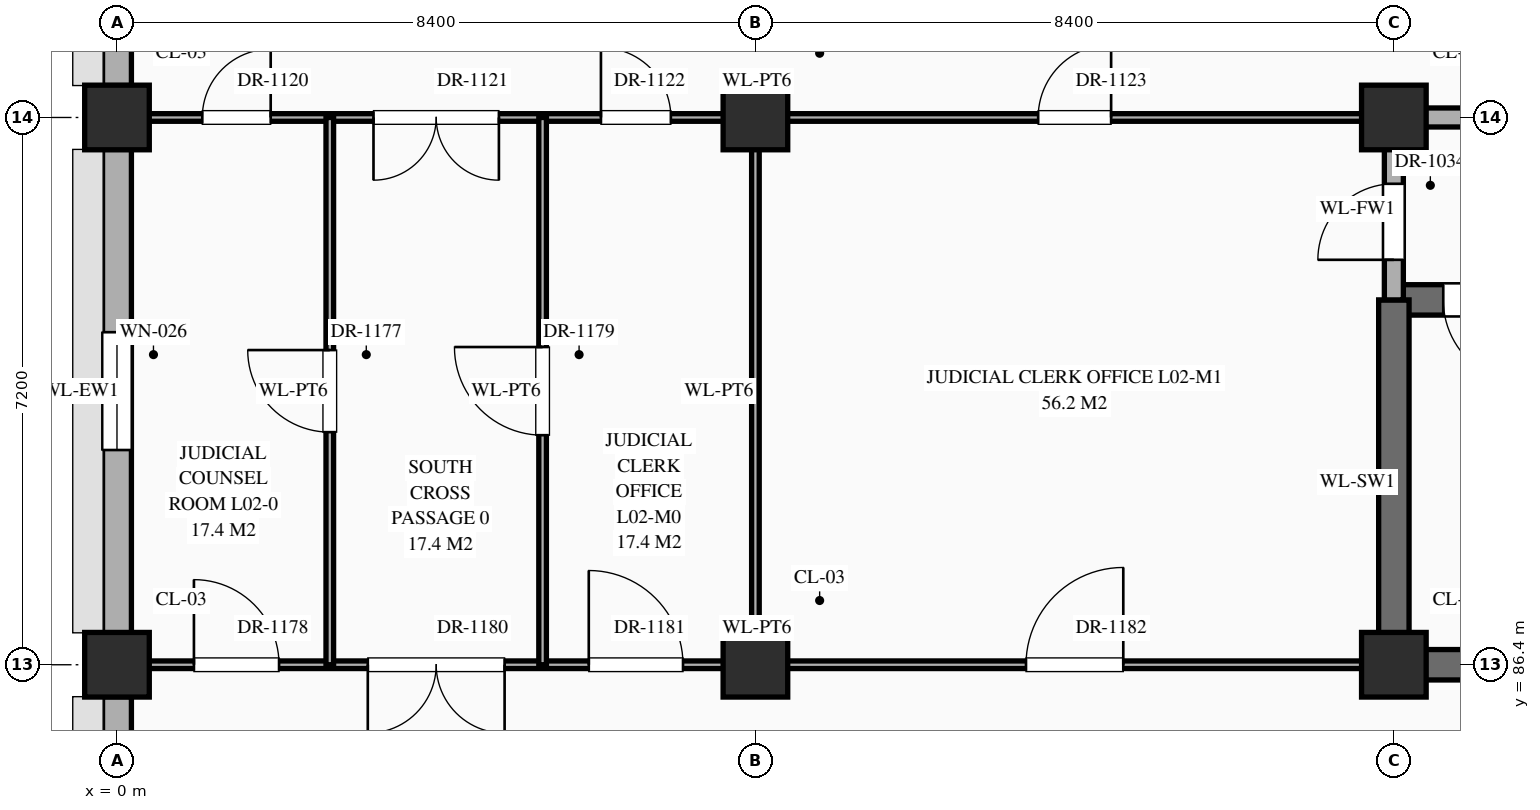
"""IFC4 building model, lengths in metres.
Left out: names, types, materials, properties, quantities, classifications, styles, units other than length and angle.
Written with IfcOpenShell. Run it as: python <this file> out.ifc"""

import sys

from ifc_helpers import new_model, si_unit, direction, frame, frame_2d, origin, origin_2d, place, context, subcontext, project, spatial, rectangle, extrude, element, fill, save


model = new_model("IFC4")
c1 = context("Model", 3, precision=1e-05, world=origin(), true_north=direction((0.0, 1.0)))
c2 = subcontext(c1, "Body", "Model", "MODEL_VIEW")
j1 = project(units=[si_unit("LENGTHUNIT", "METRE"), si_unit("PLANEANGLEUNIT", "RADIAN")], contexts=[c1])
p1 = place(None, origin())
s1 = spatial("IfcSite", under=j1, at=p1, CompositionType="ELEMENT")
p2 = place(p1, origin())
s2 = spatial("IfcBuilding", under=s1, at=p2, CompositionType="ELEMENT")
p3 = place(p2, frame((0.0, 0.0, 5.4)))
s3 = spatial("IfcBuildingStorey", under=s2, at=p3, CompositionType="ELEMENT", Elevation=5.4)
for number, where, z_axis, x_axis in (
    (1, (0.0, 86.4, 0.0), (0.0, 0.0, 1.0), (1.0, 0.0, 0.0)),
    (2, (0.0, 93.6, 0.0), (0.0, 0.0, 1.0), (1.0, 0.0, 0.0)),
    (3, (8.4, 86.4, 0.0), (0.0, 0.0, 1.0), (1.0, 0.0, 0.0)),
    (4, (8.4, 93.6, 0.0), (0.0, 0.0, 1.0), (1.0, 0.0, 0.0)),
    (5, (16.8, 86.4, 0.0), (0.0, 0.0, 1.0), (1.0, 0.0, 0.0)),
    (6, (16.8, 93.6, 0.0), (0.0, 0.0, 1.0), (1.0, 0.0, 0.0)),
):
    element("IfcColumn", number, at=place(p3, frame(where, z_axis=z_axis, x_axis=x_axis)), inside=s3, PredefinedType="COLUMN", context=c2, shape_type="SweptSolid", body=[
        extrude(rectangle(XDim=0.85, YDim=0.85, at=origin_2d()), origin(), (0.0, 0.0, 1.0), 5.4),
    ])
p4 = place(p3, frame((0.0, 79.62, 0.0), z_axis=(0.0, 0.0, 1.0), x_axis=(0.0, 1.0, 0.0)))
e7 = element("IfcWall", 7, at=p4, inside=s3, PredefinedType="STANDARD", context=c2, shape_type="SweptSolid", body=[
    extrude(rectangle(XDim=6.36, YDim=0.38, at=frame_2d((3.18, 0.0))), origin(), (0.0, 0.0, 1.0), 4.47),
])
p5 = place(p4, frame((1.205, 0.0, 0.85)))
e8 = element("IfcOpeningElement", 8, at=p5, cuts=e7, PredefinedType="OPENING", context=c2, shape_type="SweptSolid", body=[
    extrude(rectangle(XDim=1.55, YDim=1.38, at=frame_2d((0.775, 0.69))), frame((0.0, 0.202, 0.0), z_axis=(0.0, -1.0, 0.0), x_axis=(1.0, 0.0, 0.0)), (0.0, 0.0, 1.0), 0.404),
])
p6 = place(p3, frame((0.0, 86.82, 0.0), z_axis=(0.0, 0.0, 1.0), x_axis=(0.0, 1.0, 0.0)))
e9 = element("IfcWall", 9, at=p6, inside=s3, PredefinedType="STANDARD", context=c2, shape_type="SweptSolid", body=[
    extrude(rectangle(XDim=6.36, YDim=0.38, at=frame_2d((3.18, 0.0))), origin(), (0.0, 0.0, 1.0), 4.47),
])
p7 = place(p6, frame((2.405, 0.0, 0.85)))
e10 = element("IfcOpeningElement", 10, at=p7, cuts=e9, PredefinedType="OPENING", context=c2, shape_type="SweptSolid", body=[
    extrude(rectangle(XDim=1.55, YDim=1.56, at=frame_2d((0.775, 0.78))), frame((0.0, 0.202, 0.0), z_axis=(0.0, -1.0, 0.0), x_axis=(1.0, 0.0, 0.0)), (0.0, 0.0, 1.0), 0.404),
])
p8 = place(p3, frame((0.0, 94.02, 0.0), z_axis=(0.0, 0.0, 1.0), x_axis=(0.0, 1.0, 0.0)))
e11 = element("IfcWall", 11, at=p8, inside=s3, PredefinedType="STANDARD", context=c2, shape_type="SweptSolid", body=[
    extrude(rectangle(XDim=6.36, YDim=0.38, at=frame_2d((3.18, 0.0))), origin(), (0.0, 0.0, 1.0), 4.47),
])
p9 = place(p8, frame((3.705, 0.0, 0.85)))
e12 = element("IfcOpeningElement", 12, at=p9, cuts=e11, PredefinedType="OPENING", context=c2, shape_type="SweptSolid", body=[
    extrude(rectangle(XDim=1.55, YDim=1.74, at=frame_2d((0.775, 0.87))), frame((0.0, 0.202, 0.0), z_axis=(0.0, -1.0, 0.0), x_axis=(1.0, 0.0, 0.0)), (0.0, 0.0, 1.0), 0.404),
])
p10 = place(p3, frame((0.04, 86.4, 0.0), z_axis=(0.0, 0.0, 1.0), x_axis=(1.0, 0.0, 0.0)))
e13 = element("IfcWall", 13, at=p10, inside=s3, PredefinedType="STANDARD", context=c2, shape_type="SweptSolid", body=[
    extrude(rectangle(XDim=16.76, YDim=0.1, at=frame_2d((8.38, 0.0))), origin(), (0.0, 0.0, 1.0), 4.27),
])
p11 = place(p10, frame((0.972, 0.0, 0.0)))
e14 = element("IfcOpeningElement", 14, at=p11, cuts=e13, PredefinedType="OPENING", context=c2, shape_type="SweptSolid", body=[
    extrude(rectangle(XDim=1.12, YDim=2.25, at=frame_2d((0.56, 1.125))), frame((0.0, 0.062, 0.0), z_axis=(0.0, -1.0, 0.0), x_axis=(1.0, 0.0, 0.0)), (0.0, 0.0, 1.0), 0.124),
])
p12 = place(p10, frame((3.26, 0.0, 0.0)))
e15 = element("IfcOpeningElement", 15, at=p12, cuts=e13, PredefinedType="OPENING", context=c2, shape_type="SweptSolid", body=[
    extrude(rectangle(XDim=1.8, YDim=2.5, at=frame_2d((0.9, 1.25))), frame((0.0, 0.062, 0.0), z_axis=(0.0, -1.0, 0.0), x_axis=(1.0, 0.0, 0.0)), (0.0, 0.0, 1.0), 0.124),
])
p13 = place(p10, frame((6.167, 0.0, 0.0)))
e16 = element("IfcOpeningElement", 16, at=p13, cuts=e13, PredefinedType="OPENING", context=c2, shape_type="SweptSolid", body=[
    extrude(rectangle(XDim=1.24, YDim=2.3, at=frame_2d((0.62, 1.15))), frame((0.0, 0.062, 0.0), z_axis=(0.0, -1.0, 0.0), x_axis=(1.0, 0.0, 0.0)), (0.0, 0.0, 1.0), 0.124),
])
p14 = place(p10, frame((11.92, 0.0, 0.0)))
e17 = element("IfcOpeningElement", 17, at=p14, cuts=e13, PredefinedType="OPENING", context=c2, shape_type="SweptSolid", body=[
    extrude(rectangle(XDim=1.28, YDim=2.35, at=frame_2d((0.64, 1.175))), frame((0.0, 0.062, 0.0), z_axis=(0.0, -1.0, 0.0), x_axis=(1.0, 0.0, 0.0)), (0.0, 0.0, 1.0), 0.124),
])
p15 = place(p3, frame((16.8, 86.4, 0.0), z_axis=(0.0, 0.0, 1.0), x_axis=(1.0, 0.0, 0.0)))
e18 = element("IfcWall", 18, at=p15, inside=s3, PredefinedType="SHEAR", context=c2, shape_type="SweptSolid", body=[
    extrude(rectangle(XDim=8.4, YDim=0.4, at=frame_2d((4.2, 0.0))), origin(), (0.0, 0.0, 1.0), 5.12),
])
p16 = place(p3, frame((16.8, 91.2, 0.0), z_axis=(0.0, 0.0, 1.0), x_axis=(1.0, 0.0, 0.0)))
e19 = element("IfcWall", 19, at=p16, inside=s3, PredefinedType="SHEAR", context=c2, shape_type="SweptSolid", body=[
    extrude(rectangle(XDim=8.4, YDim=0.4, at=frame_2d((4.2, 0.0))), origin(), (0.0, 0.0, 1.0), 5.12),
])
p17 = place(p16, frame((0.65, 0.0, 0.0)))
e20 = element("IfcOpeningElement", 20, at=p17, cuts=e19, PredefinedType="OPENING", context=c2, shape_type="SweptSolid", body=[
    extrude(rectangle(XDim=1.1, YDim=2.2, at=frame_2d((0.55, 1.1))), frame((0.0, 0.212, 0.0), z_axis=(0.0, -1.0, 0.0), x_axis=(1.0, 0.0, 0.0)), (0.0, 0.0, 1.0), 0.424),
])
p18 = place(p3, frame((0.04, 93.6, 0.0), z_axis=(0.0, 0.0, 1.0), x_axis=(1.0, 0.0, 0.0)))
e21 = element("IfcWall", 21, at=p18, inside=s3, PredefinedType="STANDARD", context=c2, shape_type="SweptSolid", body=[
    extrude(rectangle(XDim=16.76, YDim=0.1, at=frame_2d((8.38, 0.0))), origin(), (0.0, 0.0, 1.0), 4.27),
])
p19 = place(p18, frame((1.083, 0.0, 0.0)))
e22 = element("IfcOpeningElement", 22, at=p19, cuts=e21, PredefinedType="OPENING", context=c2, shape_type="SweptSolid", body=[
    extrude(rectangle(XDim=0.9, YDim=2.15, at=frame_2d((0.45, 1.075))), frame((0.0, 0.062, 0.0), z_axis=(0.0, -1.0, 0.0), x_axis=(1.0, 0.0, 0.0)), (0.0, 0.0, 1.0), 0.124),
])
p20 = place(p18, frame((3.335, 0.0, 0.0)))
e23 = element("IfcOpeningElement", 23, at=p20, cuts=e21, PredefinedType="OPENING", context=c2, shape_type="SweptSolid", body=[
    extrude(rectangle(XDim=1.65, YDim=2.4, at=frame_2d((0.825, 1.2))), frame((0.0, 0.062, 0.0), z_axis=(0.0, -1.0, 0.0), x_axis=(1.0, 0.0, 0.0)), (0.0, 0.0, 1.0), 0.124),
])
p21 = place(p18, frame((6.327, 0.0, 0.0)))
e24 = element("IfcOpeningElement", 24, at=p21, cuts=e21, PredefinedType="OPENING", context=c2, shape_type="SweptSolid", body=[
    extrude(rectangle(XDim=0.92, YDim=2.15, at=frame_2d((0.46, 1.075))), frame((0.0, 0.062, 0.0), z_axis=(0.0, -1.0, 0.0), x_axis=(1.0, 0.0, 0.0)), (0.0, 0.0, 1.0), 0.124),
])
p22 = place(p18, frame((12.08, 0.0, 0.0)))
e25 = element("IfcOpeningElement", 25, at=p22, cuts=e21, PredefinedType="OPENING", context=c2, shape_type="SweptSolid", body=[
    extrude(rectangle(XDim=0.96, YDim=2.2, at=frame_2d((0.48, 1.1))), frame((0.0, 0.062, 0.0), z_axis=(0.0, -1.0, 0.0), x_axis=(1.0, 0.0, 0.0)), (0.0, 0.0, 1.0), 0.124),
])
p23 = place(p3, frame((16.8, 93.6, 0.0), z_axis=(0.0, 0.0, 1.0), x_axis=(1.0, 0.0, 0.0)))
e26 = element("IfcWall", 26, at=p23, inside=s3, PredefinedType="STANDARD", context=c2, shape_type="SweptSolid", body=[
    extrude(rectangle(XDim=8.4, YDim=0.25, at=frame_2d((4.2, 0.0))), origin(), (0.0, 0.0, 1.0), 4.27),
])
p24 = place(p23, frame((3.2, 0.0, 0.0)))
e27 = element("IfcOpeningElement", 27, at=p24, cuts=e26, PredefinedType="OPENING", context=c2, shape_type="SweptSolid", body=[
    extrude(rectangle(XDim=2.0, YDim=2.4, at=frame_2d((1.0, 1.2))), frame((0.0, 0.137, 0.0), z_axis=(0.0, -1.0, 0.0), x_axis=(1.0, 0.0, 0.0)), (0.0, 0.0, 1.0), 0.274),
])
p25 = place(p3, frame((2.8, 86.4, 0.0), z_axis=(0.0, 0.0, 1.0), x_axis=(0.0, 1.0, 0.0)))
e28 = element("IfcWall", 28, at=p25, inside=s3, PredefinedType="STANDARD", context=c2, shape_type="SweptSolid", body=[
    extrude(rectangle(XDim=7.2, YDim=0.1, at=frame_2d((3.6, 0.0))), origin(), (0.0, 0.0, 1.0), 5.12),
])
p26 = place(p25, frame((3.06, 0.0, 0.0)))
e29 = element("IfcOpeningElement", 29, at=p26, cuts=e28, PredefinedType="OPENING", context=c2, shape_type="SweptSolid", body=[
    extrude(rectangle(XDim=1.08, YDim=2.25, at=frame_2d((0.54, 1.125))), frame((0.0, 0.062, 0.0), z_axis=(0.0, -1.0, 0.0), x_axis=(1.0, 0.0, 0.0)), (0.0, 0.0, 1.0), 0.124),
])
p27 = place(p3, frame((5.6, 86.4, 0.0), z_axis=(0.0, 0.0, 1.0), x_axis=(0.0, 1.0, 0.0)))
e30 = element("IfcWall", 30, at=p27, inside=s3, PredefinedType="STANDARD", context=c2, shape_type="SweptSolid", body=[
    extrude(rectangle(XDim=7.2, YDim=0.1, at=frame_2d((3.6, 0.0))), origin(), (0.0, 0.0, 1.0), 5.12),
])
p28 = place(p27, frame((3.02, 0.0, 0.0)))
e31 = element("IfcOpeningElement", 31, at=p28, cuts=e30, PredefinedType="OPENING", context=c2, shape_type="SweptSolid", body=[
    extrude(rectangle(XDim=1.16, YDim=2.3, at=frame_2d((0.58, 1.15))), frame((0.0, 0.062, 0.0), z_axis=(0.0, -1.0, 0.0), x_axis=(1.0, 0.0, 0.0)), (0.0, 0.0, 1.0), 0.124),
])
p29 = place(p3, frame((8.4, 86.4, 0.0), z_axis=(0.0, 0.0, 1.0), x_axis=(0.0, 1.0, 0.0)))
e32 = element("IfcWall", 32, at=p29, inside=s3, PredefinedType="STANDARD", context=c2, shape_type="SweptSolid", body=[
    extrude(rectangle(XDim=7.2, YDim=0.1, at=frame_2d((3.6, 0.0))), origin(), (0.0, 0.0, 1.0), 4.37),
])
p30 = place(p3, frame((16.8, 86.4, 0.0), z_axis=(0.0, 0.0, 1.0), x_axis=(0.0, 1.0, 0.0)))
e33 = element("IfcWall", 33, at=p30, inside=s3, PredefinedType="SHEAR", context=c2, shape_type="SweptSolid", body=[
    extrude(rectangle(XDim=4.8, YDim=0.4, at=frame_2d((2.4, 0.0))), origin(), (0.0, 0.0, 1.0), 5.12),
])
p31 = place(p3, frame((16.8, 91.2, 0.0), z_axis=(0.0, 0.0, 1.0), x_axis=(0.0, 1.0, 0.0)))
e34 = element("IfcWall", 34, at=p31, inside=s3, PredefinedType="STANDARD", context=c2, shape_type="SweptSolid", body=[
    extrude(rectangle(XDim=2.4, YDim=0.25, at=frame_2d((1.2, 0.0))), origin(), (0.0, 0.0, 1.0), 4.37),
])
p32 = place(p31, frame((0.528, 0.0, 0.0)))
e35 = element("IfcOpeningElement", 35, at=p32, cuts=e34, PredefinedType="OPENING", context=c2, shape_type="SweptSolid", body=[
    extrude(rectangle(XDim=1.0, YDim=2.2, at=frame_2d((0.5, 1.1))), frame((0.0, 0.137, 0.0), z_axis=(0.0, -1.0, 0.0), x_axis=(1.0, 0.0, 0.0)), (0.0, 0.0, 1.0), 0.274),
])
p33 = place(p7, origin())
e36 = element("IfcWindow", 36, at=p33, inside=s3, PartitioningType="SINGLE_PANEL", PredefinedType="WINDOW", context=c2, shape_type="SweptSolid", body=[
    extrude(rectangle(XDim=1.55, YDim=1.56, at=frame_2d((0.775, 0.78))), frame((0.0, 0.03, 0.0), z_axis=(0.0, -1.0, 0.0), x_axis=(1.0, 0.0, 0.0)), (0.0, 0.0, 1.0), 0.06),
])
fill(e10, e36)
p34 = place(p17, frame((1.1, 0.0, 0.0), z_axis=(0.0, 0.0, 1.0), x_axis=(-1.0, 0.0, 0.0)))
e37 = element("IfcDoor", 37, at=p34, inside=s3, OperationType="SINGLE_SWING_LEFT", PredefinedType="DOOR", context=c2, shape_type="SweptSolid", body=[
    extrude(rectangle(XDim=1.1, YDim=2.2, at=frame_2d((0.55, 1.1))), frame((0.0, 0.025, 0.0), z_axis=(0.0, -1.0, 0.0), x_axis=(1.0, 0.0, 0.0)), (0.0, 0.0, 1.0), 0.05),
])
fill(e20, e37)
p35 = place(p32, origin())
e38 = element("IfcDoor", 38, at=p35, inside=s3, OperationType="SINGLE_SWING_LEFT", PredefinedType="DOOR", context=c2, shape_type="SweptSolid", body=[
    extrude(rectangle(XDim=1.0, YDim=2.2, at=frame_2d((0.5, 1.1))), frame((0.0, 0.025, 0.0), z_axis=(0.0, -1.0, 0.0), x_axis=(1.0, 0.0, 0.0)), (0.0, 0.0, 1.0), 0.05),
])
fill(e35, e38)
p36 = place(p19, origin())
e39 = element("IfcDoor", 39, at=p36, inside=s3, OperationType="SINGLE_SWING_RIGHT", PredefinedType="DOOR", context=c2, shape_type="SweptSolid", body=[
    extrude(rectangle(XDim=0.9, YDim=2.15, at=frame_2d((0.45, 1.075))), frame((0.0, 0.025, 0.0), z_axis=(0.0, -1.0, 0.0), x_axis=(1.0, 0.0, 0.0)), (0.0, 0.0, 1.0), 0.05),
])
fill(e22, e39)
p37 = place(p20, frame((1.65, 0.0, 0.0), z_axis=(0.0, 0.0, 1.0), x_axis=(-1.0, 0.0, 0.0)))
e40 = element("IfcDoor", 40, at=p37, inside=s3, OperationType="DOUBLE_DOOR_SINGLE_SWING", PredefinedType="DOOR", context=c2, shape_type="SweptSolid", body=[
    extrude(rectangle(XDim=1.65, YDim=2.4, at=frame_2d((0.825, 1.2))), frame((0.0, 0.025, 0.0), z_axis=(0.0, -1.0, 0.0), x_axis=(1.0, 0.0, 0.0)), (0.0, 0.0, 1.0), 0.05),
])
fill(e23, e40)
p38 = place(p21, origin())
e41 = element("IfcDoor", 41, at=p38, inside=s3, OperationType="SINGLE_SWING_LEFT", PredefinedType="DOOR", context=c2, shape_type="SweptSolid", body=[
    extrude(rectangle(XDim=0.92, YDim=2.15, at=frame_2d((0.46, 1.075))), frame((0.0, 0.025, 0.0), z_axis=(0.0, -1.0, 0.0), x_axis=(1.0, 0.0, 0.0)), (0.0, 0.0, 1.0), 0.05),
])
fill(e24, e41)
p39 = place(p22, origin())
e42 = element("IfcDoor", 42, at=p39, inside=s3, OperationType="SINGLE_SWING_RIGHT", PredefinedType="DOOR", context=c2, shape_type="SweptSolid", body=[
    extrude(rectangle(XDim=0.96, YDim=2.2, at=frame_2d((0.48, 1.1))), frame((0.0, 0.025, 0.0), z_axis=(0.0, -1.0, 0.0), x_axis=(1.0, 0.0, 0.0)), (0.0, 0.0, 1.0), 0.05),
])
fill(e25, e42)
p40 = place(p26, origin())
e43 = element("IfcDoor", 43, at=p40, inside=s3, OperationType="SINGLE_SWING_RIGHT", PredefinedType="DOOR", context=c2, shape_type="SweptSolid", body=[
    extrude(rectangle(XDim=1.08, YDim=2.25, at=frame_2d((0.54, 1.125))), frame((0.0, 0.025, 0.0), z_axis=(0.0, -1.0, 0.0), x_axis=(1.0, 0.0, 0.0)), (0.0, 0.0, 1.0), 0.05),
])
fill(e29, e43)
p41 = place(p11, origin())
e44 = element("IfcDoor", 44, at=p41, inside=s3, OperationType="SINGLE_SWING_LEFT", PredefinedType="DOOR", context=c2, shape_type="SweptSolid", body=[
    extrude(rectangle(XDim=1.12, YDim=2.25, at=frame_2d((0.56, 1.125))), frame((0.0, 0.025, 0.0), z_axis=(0.0, -1.0, 0.0), x_axis=(1.0, 0.0, 0.0)), (0.0, 0.0, 1.0), 0.05),
])
fill(e14, e44)
p42 = place(p28, origin())
e45 = element("IfcDoor", 45, at=p42, inside=s3, OperationType="SINGLE_SWING_RIGHT", PredefinedType="DOOR", context=c2, shape_type="SweptSolid", body=[
    extrude(rectangle(XDim=1.16, YDim=2.3, at=frame_2d((0.58, 1.15))), frame((0.0, 0.025, 0.0), z_axis=(0.0, -1.0, 0.0), x_axis=(1.0, 0.0, 0.0)), (0.0, 0.0, 1.0), 0.05),
])
fill(e31, e45)
p43 = place(p12, frame((1.8, 0.0, 0.0), z_axis=(0.0, 0.0, 1.0), x_axis=(-1.0, 0.0, 0.0)))
e46 = element("IfcDoor", 46, at=p43, inside=s3, OperationType="DOUBLE_DOOR_SINGLE_SWING", PredefinedType="DOOR", context=c2, shape_type="SweptSolid", body=[
    extrude(rectangle(XDim=1.8, YDim=2.5, at=frame_2d((0.9, 1.25))), frame((0.0, 0.025, 0.0), z_axis=(0.0, -1.0, 0.0), x_axis=(1.0, 0.0, 0.0)), (0.0, 0.0, 1.0), 0.05),
])
fill(e15, e46)
p44 = place(p13, origin())
e47 = element("IfcDoor", 47, at=p44, inside=s3, OperationType="SINGLE_SWING_LEFT", PredefinedType="DOOR", context=c2, shape_type="SweptSolid", body=[
    extrude(rectangle(XDim=1.24, YDim=2.3, at=frame_2d((0.62, 1.15))), frame((0.0, 0.025, 0.0), z_axis=(0.0, -1.0, 0.0), x_axis=(1.0, 0.0, 0.0)), (0.0, 0.0, 1.0), 0.05),
])
fill(e16, e47)
p45 = place(p14, origin())
e48 = element("IfcDoor", 48, at=p45, inside=s3, OperationType="SINGLE_SWING_RIGHT", PredefinedType="DOOR", context=c2, shape_type="SweptSolid", body=[
    extrude(rectangle(XDim=1.28, YDim=2.35, at=frame_2d((0.64, 1.175))), frame((0.0, 0.025, 0.0), z_axis=(0.0, -1.0, 0.0), x_axis=(1.0, 0.0, 0.0)), (0.0, 0.0, 1.0), 0.05),
])
fill(e17, e48)
save(model, sys.argv[1])
